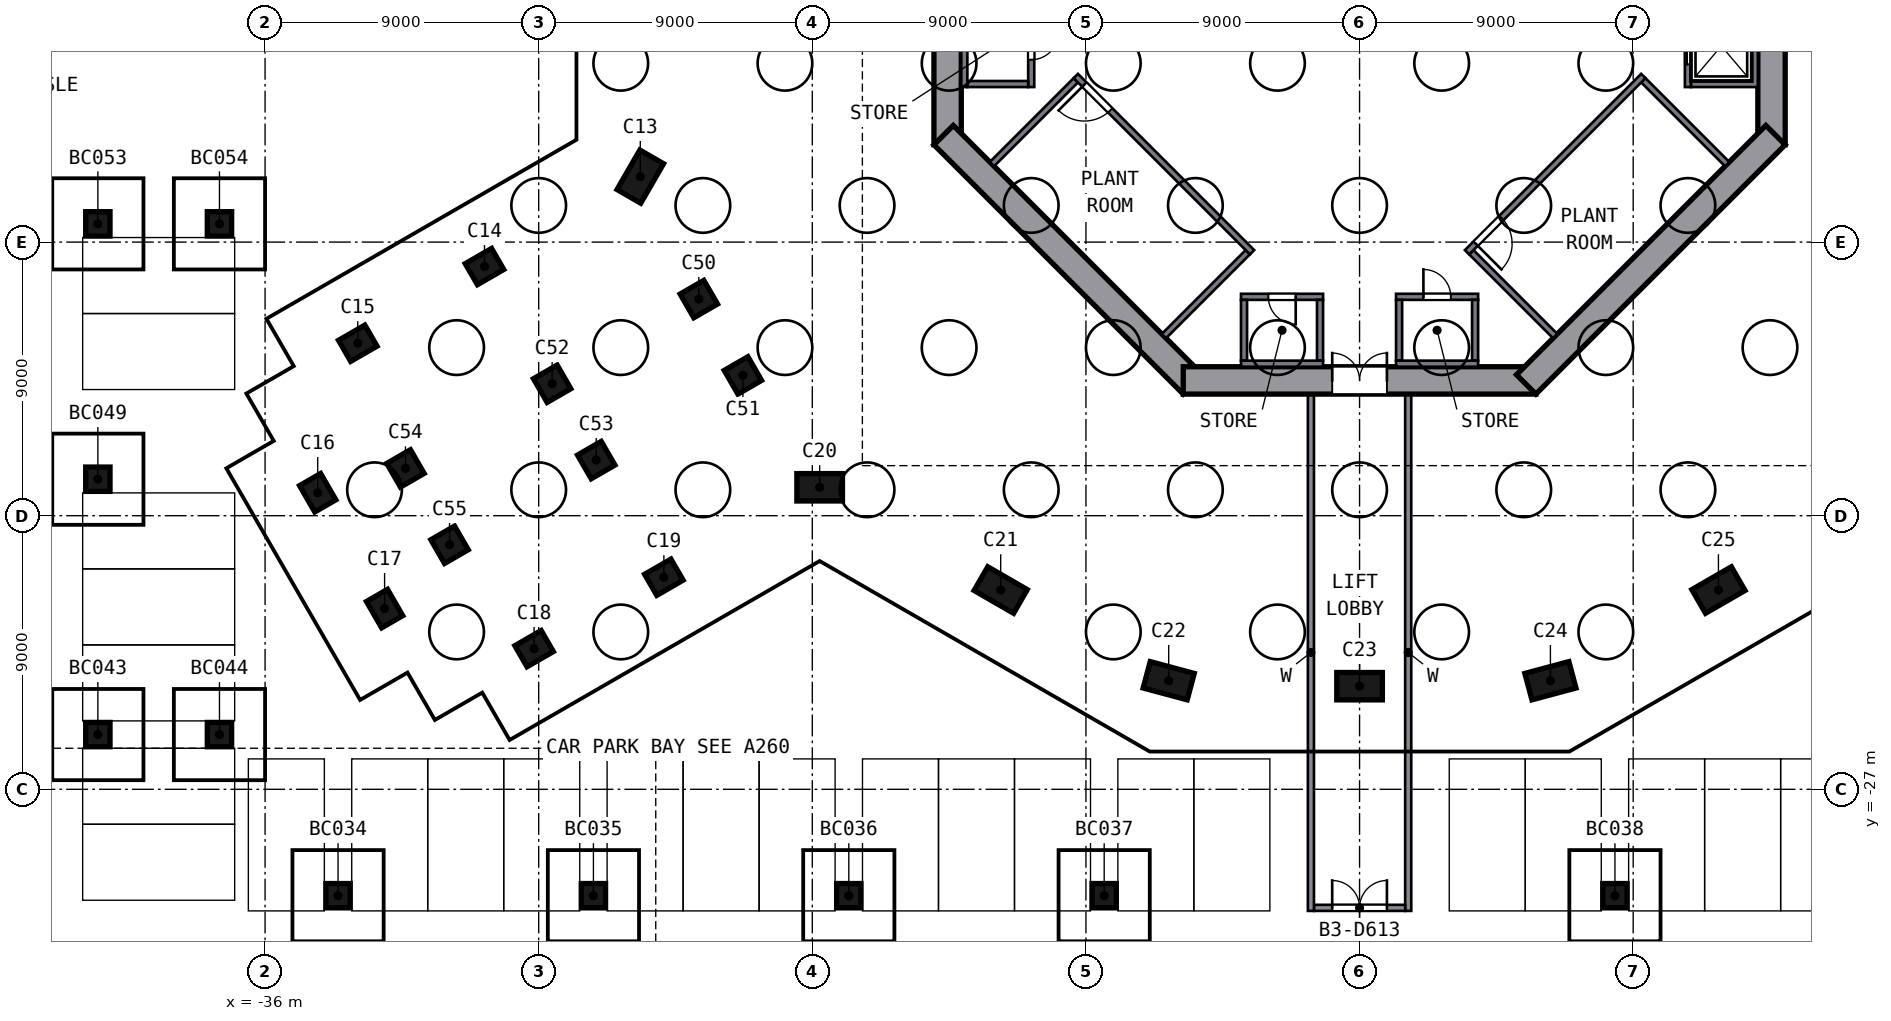
"""IFC4 building model, lengths in metres.
Left out: names, types, materials, properties, quantities, classifications, styles, units other than length and angle.
Written with IfcOpenShell. Run it as: python <this file> out.ifc"""

import sys

from ifc_helpers import new_model, si_unit, direction, frame, frame_2d, origin, origin_2d, place, context, subcontext, project, spatial, polyline, rectangle, outline, extrude, element, fill, save


model = new_model("IFC4")
c1 = context("Model", 3, precision=1e-05, world=origin(), true_north=direction((0.0, 1.0)))
c2 = subcontext(c1, "Body", "Model", "MODEL_VIEW")
j1 = project(units=[si_unit("LENGTHUNIT", "METRE"), si_unit("PLANEANGLEUNIT", "RADIAN")], contexts=[c1])
p1 = place(None, origin())
s1 = spatial("IfcSite", under=j1, at=p1, CompositionType="ELEMENT")
p2 = place(p1, origin())
s2 = spatial("IfcBuilding", under=s1, at=p2, CompositionType="ELEMENT")
p3 = place(p2, frame((0.0, 0.0, -11.7)))
s3 = spatial("IfcBuildingStorey", under=s2, at=p3, CompositionType="ELEMENT", Elevation=-11.7)
p4 = place(p3, frame((-23.658, -6.846, 0.0), z_axis=(0.0, 0.0, 1.0), x_axis=(0.5, 0.866025404, 0.0)))
e1 = element("IfcColumn", 1, at=p4, inside=s3, PredefinedType="COLUMN", context=c2, shape_type="SweptSolid", body=[
    extrude(rectangle(XDim=1.5, YDim=0.9, at=origin_2d()), origin(), (0.0, 0.0, 1.0), 3.45),
])
for number, where, z_axis, x_axis in (
    (2, (-28.783, -9.805, 0.0), (0.0, 0.0, 1.0), (-0.866, -0.5, 0.0)),
    (3, (-32.951, -12.327, 0.0), (0.0, 0.0, 1.0), (-0.866, -0.5, 0.0)),
    (4, (-34.269, -17.245, 0.0), (0.0, 0.0, 1.0), (0.5, -0.866, 0.0)),
    (5, (-32.069, -21.055, 0.0), (0.0, 0.0, 1.0), (0.5, -0.866, 0.0)),
    (6, (-27.151, -22.373, 0.0), (0.0, 0.0, 1.0), (0.866, 0.5, 0.0)),
    (7, (-22.883, -20.024, 0.0), (0.0, 0.0, 1.0), (0.866, 0.5, 0.0)),
):
    element("IfcColumn", number, at=place(p3, frame(where, z_axis=z_axis, x_axis=x_axis)), inside=s3, PredefinedType="COLUMN", context=c2, shape_type="SweptSolid", body=[
        extrude(rectangle(XDim=1.0, YDim=0.8, at=origin_2d()), origin(), (0.0, 0.0, 1.0), 3.45),
    ])
for number, where, z_axis, x_axis in (
    (8, (-17.758, -17.065, 0.0), (0.0, 0.0, 1.0), (-1.0, 0.0, 0.0)),
    (9, (-11.804, -20.445, 0.0), (0.0, 0.0, 1.0), (0.866, -0.5, 0.0)),
    (10, (-6.278, -23.428, 0.0), (0.0, 0.0, 1.0), (-0.966, 0.259, 0.0)),
    (11, (0.0, -23.608, 0.0), (0.0, 0.0, 1.0), (1.0, 0.0, 0.0)),
    (12, (6.278, -23.428, 0.0), (0.0, 0.0, 1.0), (-0.966, -0.259, 0.0)),
    (13, (11.804, -20.445, 0.0), (0.0, 0.0, 1.0), (0.866, 0.5, 0.0)),
):
    element("IfcColumn", number, at=place(p3, frame(where, z_axis=z_axis, x_axis=x_axis)), inside=s3, PredefinedType="COLUMN", context=c2, shape_type="SweptSolid", body=[
        extrude(rectangle(XDim=1.5, YDim=0.9, at=origin_2d()), origin(), (0.0, 0.0, 1.0), 3.45),
    ])
for number, where, z_axis, x_axis in (
    (14, (-21.733, -10.873, 0.0), (0.0, 0.0, 1.0), (-0.866, -0.5, 0.0)),
    (15, (-20.283, -13.385, 0.0), (0.0, 0.0, 1.0), (-0.866, -0.5, 0.0)),
    (16, (-26.558, -13.659, 0.0), (0.0, 0.0, 1.0), (-0.866, -0.5, 0.0)),
    (17, (-25.108, -16.17, 0.0), (0.0, 0.0, 1.0), (-0.866, -0.5, 0.0)),
    (18, (-31.382, -16.444, 0.0), (0.0, 0.0, 1.0), (-0.866, -0.5, 0.0)),
    (19, (-29.932, -18.956, 0.0), (0.0, 0.0, 1.0), (-0.866, -0.5, 0.0)),
):
    element("IfcColumn", number, at=place(p3, frame(where, z_axis=z_axis, x_axis=x_axis)), inside=s3, PredefinedType="COLUMN", context=c2, shape_type="SweptSolid", body=[
        extrude(rectangle(XDim=0.9, YDim=0.9, at=origin_2d()), origin(), (0.0, 0.0, 1.0), 3.45),
    ])
p5 = place(p3, frame((13.55, -5.799, 0.0), z_axis=(0.0, 0.0, 1.0), x_axis=(0.0, 1.0, 0.0)))
e20 = element("IfcWall", 20, at=p5, inside=s3, PredefinedType="SHEAR", context=c2, shape_type="SweptSolid", body=[
    extrude(rectangle(XDim=11.598, YDim=0.9, at=frame_2d((5.799, 0.0))), origin(), (0.0, 0.0, 1.0), 3.9),
])
p6 = place(p5, frame((4.899, 0.0, 0.0)))
e21 = element("IfcOpeningElement", 21, at=p6, cuts=e20, PredefinedType="OPENING", context=c2, shape_type="SweptSolid", body=[
    extrude(rectangle(XDim=1.8, YDim=2.1, at=frame_2d((0.9, 1.05))), frame((0.0, 0.46, 0.0), z_axis=(0.0, -1.0, 0.0), x_axis=(1.0, 0.0, 0.0)), (0.0, 0.0, 1.0), 0.92),
])
p7 = place(p3, frame((-13.55, 5.799, 0.0), z_axis=(0.0, 0.0, 1.0), x_axis=(0.0, -1.0, 0.0)))
e22 = element("IfcWall", 22, at=p7, inside=s3, PredefinedType="SHEAR", context=c2, shape_type="SweptSolid", body=[
    extrude(rectangle(XDim=11.598, YDim=0.9, at=frame_2d((5.799, 0.0))), origin(), (0.0, 0.0, 1.0), 3.9),
])
p8 = place(p7, frame((4.899, 0.0, 0.0)))
e23 = element("IfcOpeningElement", 23, at=p8, cuts=e22, PredefinedType="OPENING", context=c2, shape_type="SweptSolid", body=[
    extrude(rectangle(XDim=1.8, YDim=2.1, at=frame_2d((0.9, 1.05))), frame((0.0, 0.46, 0.0), z_axis=(0.0, -1.0, 0.0), x_axis=(1.0, 0.0, 0.0)), (0.0, 0.0, 1.0), 0.92),
])
p9 = place(p3, frame((-13.682, -5.481, 0.0), z_axis=(0.0, 0.0, 1.0), x_axis=(0.707106781, -0.707106781, 0.0)))
e24 = element("IfcWall", 24, at=p9, inside=s3, PredefinedType="SHEAR", context=c2, shape_type="SweptSolid", body=[
    extrude(rectangle(XDim=11.598, YDim=0.9, at=frame_2d((5.799, 0.0))), origin(), (0.0, 0.0, 1.0), 3.9),
])
p10 = place(p3, frame((-5.799, -13.55, 0.0), z_axis=(0.0, 0.0, 1.0), x_axis=(1.0, 0.0, 0.0)))
e25 = element("IfcWall", 25, at=p10, inside=s3, PredefinedType="SHEAR", context=c2, shape_type="SweptSolid", body=[
    extrude(rectangle(XDim=11.598, YDim=0.9, at=frame_2d((5.799, 0.0))), origin(), (0.0, 0.0, 1.0), 3.9),
])
p11 = place(p10, frame((4.899, 0.0, 0.0)))
e26 = element("IfcOpeningElement", 26, at=p11, cuts=e25, PredefinedType="OPENING", context=c2, shape_type="SweptSolid", body=[
    extrude(rectangle(XDim=1.8, YDim=2.1, at=frame_2d((0.9, 1.05))), frame((0.0, 0.46, 0.0), z_axis=(0.0, -1.0, 0.0), x_axis=(1.0, 0.0, 0.0)), (0.0, 0.0, 1.0), 0.92),
])
p12 = place(p3, frame((5.481, -13.682, 0.0), z_axis=(0.0, 0.0, 1.0), x_axis=(0.707106781, 0.707106781, 0.0)))
e27 = element("IfcWall", 27, at=p12, inside=s3, PredefinedType="SHEAR", context=c2, shape_type="SweptSolid", body=[
    extrude(rectangle(XDim=11.598, YDim=0.9, at=frame_2d((5.799, 0.0))), origin(), (0.0, 0.0, 1.0), 3.9),
])
for number, where, z_axis, x_axis in (
    (28, (-33.6, -30.5, -0.8), (0.0, 0.0, 1.0), (1.0, 0.0, 0.0)),
    (29, (-25.2, -30.5, -0.8), (0.0, 0.0, 1.0), (1.0, 0.0, 0.0)),
    (30, (-16.8, -30.5, -0.8), (0.0, 0.0, 1.0), (1.0, 0.0, 0.0)),
    (31, (-8.4, -30.5, -0.8), (0.0, 0.0, 1.0), (1.0, 0.0, 0.0)),
    (32, (8.4, -30.5, -0.8), (0.0, 0.0, 1.0), (1.0, 0.0, 0.0)),
    (33, (-41.5, -25.2, -0.8), (0.0, 0.0, 1.0), (1.0, 0.0, 0.0)),
    (34, (-37.5, -25.2, -0.8), (0.0, 0.0, 1.0), (1.0, 0.0, 0.0)),
    (35, (-41.5, -16.8, -0.8), (0.0, 0.0, 1.0), (1.0, 0.0, 0.0)),
    (36, (-41.5, -8.4, -0.8), (0.0, 0.0, 1.0), (1.0, 0.0, 0.0)),
    (37, (-37.5, -8.4, -0.8), (0.0, 0.0, 1.0), (1.0, 0.0, 0.0)),
):
    element("IfcColumn", number, at=place(p3, frame(where, z_axis=z_axis, x_axis=x_axis)), inside=s3, PredefinedType="COLUMN", context=c2, shape_type="SweptSolid", body=[
        extrude(rectangle(XDim=0.8, YDim=0.8, at=origin_2d()), origin(), (0.0, 0.0, 1.0), 4.7),
    ])
p13 = place(p3, origin())
e38 = element("IfcWall", 38, at=p13, inside=s3, PredefinedType="SOLIDWALL", context=c2, shape_type="SweptSolid", body=[
    extrude(outline(polyline([(13.1, -3.9), (10.9, -3.9), (10.9, -3.7), (12.9, -3.7), (12.9, -1.4), (10.9, -1.4), (10.9, -1.2), (13.1, -1.2), (13.1, -3.9)])), origin(), (0.0, 0.0, 1.0), 3.45),
])
p14 = place(p3, frame((10.8, -1.2, 0.0), z_axis=(0.0, 0.0, 1.0), x_axis=(0.0, -1.0, 0.0)))
e39 = element("IfcWall", 39, at=p14, inside=s3, PredefinedType="SOLIDWALL", context=c2, shape_type="SweptSolid", body=[
    extrude(rectangle(XDim=2.7, YDim=0.2, at=frame_2d((1.35, 0.0))), origin(), (0.0, 0.0, 1.0), 3.45),
])
p15 = place(p14, frame((0.75, 0.0, 0.0)))
e40 = element("IfcOpeningElement", 40, at=p15, cuts=e39, PredefinedType="OPENING", context=c2, shape_type="SweptSolid", body=[
    extrude(rectangle(XDim=1.2, YDim=2.1, at=frame_2d((0.6, 1.05))), frame((0.0, 0.11, 0.0), z_axis=(0.0, -1.0, 0.0), x_axis=(1.0, 0.0, 0.0)), (0.0, 0.0, 1.0), 0.22),
])
p16 = place(p3, origin())
e41 = element("IfcWall", 41, at=p16, inside=s3, PredefinedType="SOLIDWALL", context=c2, shape_type="SweptSolid", body=[
    extrude(outline(polyline([(-10.9, -3.7), (-10.9, -3.9), (-12.9, -3.9), (-12.9, -3.7), (-10.9, -3.7)])), origin(), (0.0, 0.0, 1.0), 3.45),
])
p17 = place(p3, origin())
e42 = element("IfcWall", 42, at=p17, inside=s3, PredefinedType="SOLIDWALL", context=c2, shape_type="SweptSolid", body=[
    extrude(outline(polyline([(-12.9, -1.2), (-12.9, -3.9), (-13.1, -3.9), (-13.1, -1.2), (-12.9, -1.2)])), origin(), (0.0, 0.0, 1.0), 3.45),
])
p18 = place(p3, frame((-10.8, -1.2, 0.0), z_axis=(0.0, 0.0, 1.0), x_axis=(0.0, -1.0, 0.0)))
e43 = element("IfcWall", 43, at=p18, inside=s3, PredefinedType="SOLIDWALL", context=c2, shape_type="SweptSolid", body=[
    extrude(rectangle(XDim=2.7, YDim=0.2, at=frame_2d((1.35, 0.0))), origin(), (0.0, 0.0, 1.0), 3.45),
])
p19 = place(p18, frame((0.9, 0.0, 0.0)))
e44 = element("IfcOpeningElement", 44, at=p19, cuts=e43, PredefinedType="OPENING", context=c2, shape_type="SweptSolid", body=[
    extrude(rectangle(XDim=0.9, YDim=2.1, at=frame_2d((0.45, 1.05))), frame((0.0, 0.11, 0.0), z_axis=(0.0, -1.0, 0.0), x_axis=(1.0, 0.0, 0.0)), (0.0, 0.0, 1.0), 0.22),
])
p20 = place(p3, origin())
e45 = element("IfcWall", 45, at=p20, inside=s3, PredefinedType="SOLIDWALL", context=c2, shape_type="SweptSolid", body=[
    extrude(outline(polyline([(-1.2, -10.9), (-1.2, -12.9), (-1.4, -12.9), (-1.4, -10.9), (-1.2, -10.9)])), origin(), (0.0, 0.0, 1.0), 3.45),
])
p21 = place(p3, origin())
e46 = element("IfcWall", 46, at=p21, inside=s3, PredefinedType="SOLIDWALL", context=c2, shape_type="SweptSolid", body=[
    extrude(outline(polyline([(-3.7, -10.9), (-3.7, -12.9), (-3.9, -12.9), (-3.9, -10.9), (-3.7, -10.9)])), origin(), (0.0, 0.0, 1.0), 3.45),
])
p22 = place(p3, origin())
e47 = element("IfcWall", 47, at=p22, inside=s3, PredefinedType="SOLIDWALL", context=c2, shape_type="SweptSolid", body=[
    extrude(outline(polyline([(-1.2, -12.9), (-1.2, -13.1), (-3.9, -13.1), (-3.9, -12.9), (-1.2, -12.9)])), origin(), (0.0, 0.0, 1.0), 3.45),
])
p23 = place(p3, frame((-1.2, -10.8, 0.0), z_axis=(0.0, 0.0, 1.0), x_axis=(-1.0, 0.0, 0.0)))
e48 = element("IfcWall", 48, at=p23, inside=s3, PredefinedType="SOLIDWALL", context=c2, shape_type="SweptSolid", body=[
    extrude(rectangle(XDim=2.7, YDim=0.2, at=frame_2d((1.35, 0.0))), origin(), (0.0, 0.0, 1.0), 3.45),
])
p24 = place(p23, frame((0.9, 0.0, 0.0)))
e49 = element("IfcOpeningElement", 49, at=p24, cuts=e48, PredefinedType="OPENING", context=c2, shape_type="SweptSolid", body=[
    extrude(rectangle(XDim=0.9, YDim=2.1, at=frame_2d((0.45, 1.05))), frame((0.0, 0.11, 0.0), z_axis=(0.0, -1.0, 0.0), x_axis=(1.0, 0.0, 0.0)), (0.0, 0.0, 1.0), 0.22),
])
p25 = place(p3, origin())
e50 = element("IfcWall", 50, at=p25, inside=s3, PredefinedType="SOLIDWALL", context=c2, shape_type="SweptSolid", body=[
    extrude(outline(polyline([(1.2, -10.9), (1.4, -10.9), (1.4, -12.9), (1.2, -12.9), (1.2, -10.9)])), origin(), (0.0, 0.0, 1.0), 3.45),
])
p26 = place(p3, origin())
e51 = element("IfcWall", 51, at=p26, inside=s3, PredefinedType="SOLIDWALL", context=c2, shape_type="SweptSolid", body=[
    extrude(outline(polyline([(3.7, -10.9), (3.9, -10.9), (3.9, -12.9), (3.7, -12.9), (3.7, -10.9)])), origin(), (0.0, 0.0, 1.0), 3.45),
])
p27 = place(p3, origin())
e52 = element("IfcWall", 52, at=p27, inside=s3, PredefinedType="SOLIDWALL", context=c2, shape_type="SweptSolid", body=[
    extrude(outline(polyline([(1.2, -12.9), (3.9, -12.9), (3.9, -13.1), (1.2, -13.1), (1.2, -12.9)])), origin(), (0.0, 0.0, 1.0), 3.45),
])
p28 = place(p3, frame((1.2, -10.8, 0.0), z_axis=(0.0, 0.0, 1.0), x_axis=(1.0, 0.0, 0.0)))
e53 = element("IfcWall", 53, at=p28, inside=s3, PredefinedType="SOLIDWALL", context=c2, shape_type="SweptSolid", body=[
    extrude(rectangle(XDim=2.7, YDim=0.2, at=frame_2d((1.35, 0.0))), origin(), (0.0, 0.0, 1.0), 3.45),
])
p29 = place(p28, frame((0.9, 0.0, 0.0)))
e54 = element("IfcOpeningElement", 54, at=p29, cuts=e53, PredefinedType="OPENING", context=c2, shape_type="SweptSolid", body=[
    extrude(rectangle(XDim=0.9, YDim=2.1, at=frame_2d((0.45, 1.05))), frame((0.0, 0.11, 0.0), z_axis=(0.0, -1.0, 0.0), x_axis=(1.0, 0.0, 0.0)), (0.0, 0.0, 1.0), 0.22),
])
p30 = place(p3, frame((-3.535, -9.334, 0.0), z_axis=(0.0, 0.0, 1.0), x_axis=(-0.707106781, 0.707106781, 0.0)))
e55 = element("IfcWall", 55, at=p30, inside=s3, PredefinedType="SOLIDWALL", context=c2, shape_type="SweptSolid", body=[
    extrude(rectangle(XDim=8.2, YDim=0.2, at=frame_2d((4.1, 0.0))), origin(), (0.0, 0.0, 1.0), 3.45),
])
p31 = place(p30, frame((6.6, 0.0, 0.0)))
e56 = element("IfcOpeningElement", 56, at=p31, cuts=e55, PredefinedType="OPENING", context=c2, shape_type="SweptSolid", body=[
    extrude(rectangle(XDim=1.2, YDim=2.1, at=frame_2d((0.6, 1.05))), frame((0.0, 0.11, 0.0), z_axis=(0.0, -1.0, 0.0), x_axis=(1.0, 0.0, 0.0)), (0.0, 0.0, 1.0), 0.22),
])
for number, where, z_axis, x_axis in (
    (57, (-9.334, -3.677, 0.0), (0.0, 0.0, 1.0), (-0.707, -0.707, 0.0)),
    (58, (-3.677, -9.334, 0.0), (0.0, 0.0, 1.0), (-0.707, -0.707, 0.0)),
):
    element("IfcWall", number, at=place(p3, frame(where, z_axis=z_axis, x_axis=x_axis)), inside=s3, PredefinedType="SOLIDWALL", context=c2, shape_type="SweptSolid", body=[
        extrude(rectangle(XDim=3.9, YDim=0.2, at=frame_2d((1.95, 0.0))), origin(), (0.0, 0.0, 1.0), 3.45),
    ])
p32 = place(p3, frame((9.334, -3.535, 0.0), z_axis=(0.0, 0.0, 1.0), x_axis=(-0.707106781, -0.707106781, 0.0)))
e59 = element("IfcWall", 59, at=p32, inside=s3, PredefinedType="SOLIDWALL", context=c2, shape_type="SweptSolid", body=[
    extrude(rectangle(XDim=8.2, YDim=0.2, at=frame_2d((4.1, 0.0))), origin(), (0.0, 0.0, 1.0), 3.45),
])
p33 = place(p32, frame((6.6, 0.0, 0.0)))
e60 = element("IfcOpeningElement", 60, at=p33, cuts=e59, PredefinedType="OPENING", context=c2, shape_type="SweptSolid", body=[
    extrude(rectangle(XDim=1.2, YDim=2.1, at=frame_2d((0.6, 1.05))), frame((0.0, 0.11, 0.0), z_axis=(0.0, -1.0, 0.0), x_axis=(1.0, 0.0, 0.0)), (0.0, 0.0, 1.0), 0.22),
])
for number, where, z_axis, x_axis in (
    (61, (3.677, -9.334, 0.0), (0.0, 0.0, 1.0), (0.707, -0.707, 0.0)),
    (62, (9.334, -3.677, 0.0), (0.0, 0.0, 1.0), (0.707, -0.707, 0.0)),
):
    element("IfcWall", number, at=place(p3, frame(where, z_axis=z_axis, x_axis=x_axis)), inside=s3, PredefinedType="SOLIDWALL", context=c2, shape_type="SweptSolid", body=[
        extrude(rectangle(XDim=3.9, YDim=0.2, at=frame_2d((1.95, 0.0))), origin(), (0.0, 0.0, 1.0), 3.45),
    ])
for number, where, z_axis, x_axis in (
    (63, (-1.6, -31.0, 0.0), (0.0, 0.0, 1.0), (0.0, 1.0, 0.0)),
    (64, (1.6, -31.0, 0.0), (0.0, 0.0, 1.0), (0.0, 1.0, 0.0)),
):
    element("IfcWall", number, at=place(p3, frame(where, z_axis=z_axis, x_axis=x_axis)), inside=s3, PredefinedType="PARTITIONING", context=c2, shape_type="SweptSolid", body=[
        extrude(rectangle(XDim=17.0, YDim=0.2, at=frame_2d((8.5, 0.0))), origin(), (0.0, 0.0, 1.0), 3.45),
    ])
p34 = place(p3, frame((-1.5, -30.9, 0.0), z_axis=(0.0, 0.0, 1.0), x_axis=(1.0, 0.0, 0.0)))
e65 = element("IfcWall", 65, at=p34, inside=s3, PredefinedType="PARTITIONING", context=c2, shape_type="SweptSolid", body=[
    extrude(rectangle(XDim=3.0, YDim=0.2, at=frame_2d((1.5, 0.0))), origin(), (0.0, 0.0, 1.0), 3.45),
])
p35 = place(p34, frame((0.6, 0.0, 0.0)))
e66 = element("IfcOpeningElement", 66, at=p35, cuts=e65, PredefinedType="OPENING", context=c2, shape_type="SweptSolid", body=[
    extrude(rectangle(XDim=1.8, YDim=2.1, at=frame_2d((0.9, 1.05))), frame((0.0, 0.11, 0.0), z_axis=(0.0, -1.0, 0.0), x_axis=(1.0, 0.0, 0.0)), (0.0, 0.0, 1.0), 0.22),
])
p36 = place(p19, origin())
e67 = element("IfcDoor", 67, at=p36, inside=s3, OperationType="SINGLE_SWING_LEFT", PredefinedType="DOOR", context=c2, shape_type="SweptSolid", body=[
    extrude(rectangle(XDim=0.9, YDim=2.1, at=frame_2d((0.45, 1.05))), frame((0.0, 0.025, 0.0), z_axis=(0.0, -1.0, 0.0), x_axis=(1.0, 0.0, 0.0)), (0.0, 0.0, 1.0), 0.05),
])
fill(e44, e67)
p37 = place(p24, origin())
e68 = element("IfcDoor", 68, at=p37, inside=s3, OperationType="SINGLE_SWING_LEFT", PredefinedType="DOOR", context=c2, shape_type="SweptSolid", body=[
    extrude(rectangle(XDim=0.9, YDim=2.1, at=frame_2d((0.45, 1.05))), frame((0.0, 0.025, 0.0), z_axis=(0.0, -1.0, 0.0), x_axis=(1.0, 0.0, 0.0)), (0.0, 0.0, 1.0), 0.05),
])
fill(e49, e68)
p38 = place(p29, origin())
e69 = element("IfcDoor", 69, at=p38, inside=s3, OperationType="SINGLE_SWING_LEFT", PredefinedType="DOOR", context=c2, shape_type="SweptSolid", body=[
    extrude(rectangle(XDim=0.9, YDim=2.1, at=frame_2d((0.45, 1.05))), frame((0.0, 0.025, 0.0), z_axis=(0.0, -1.0, 0.0), x_axis=(1.0, 0.0, 0.0)), (0.0, 0.0, 1.0), 0.05),
])
fill(e54, e69)
p39 = place(p15, origin())
e70 = element("IfcDoor", 70, at=p39, inside=s3, OperationType="DOUBLE_DOOR_SLIDING", PredefinedType="DOOR", context=c2, shape_type="SweptSolid", body=[
    extrude(rectangle(XDim=1.2, YDim=2.1, at=frame_2d((0.6, 1.05))), frame((0.0, 0.025, 0.0), z_axis=(0.0, -1.0, 0.0), x_axis=(1.0, 0.0, 0.0)), (0.0, 0.0, 1.0), 0.05),
])
fill(e40, e70)
p40 = place(p31, origin())
e71 = element("IfcDoor", 71, at=p40, inside=s3, OperationType="SINGLE_SWING_RIGHT", PredefinedType="DOOR", context=c2, shape_type="SweptSolid", body=[
    extrude(rectangle(XDim=1.2, YDim=2.1, at=frame_2d((0.6, 1.05))), frame((0.0, 0.025, 0.0), z_axis=(0.0, -1.0, 0.0), x_axis=(1.0, 0.0, 0.0)), (0.0, 0.0, 1.0), 0.05),
])
fill(e56, e71)
p41 = place(p33, origin())
e72 = element("IfcDoor", 72, at=p41, inside=s3, OperationType="SINGLE_SWING_RIGHT", PredefinedType="DOOR", context=c2, shape_type="SweptSolid", body=[
    extrude(rectangle(XDim=1.2, YDim=2.1, at=frame_2d((0.6, 1.05))), frame((0.0, 0.025, 0.0), z_axis=(0.0, -1.0, 0.0), x_axis=(1.0, 0.0, 0.0)), (0.0, 0.0, 1.0), 0.05),
])
fill(e60, e72)
p42 = place(p11, origin())
e73 = element("IfcDoor", 73, at=p42, inside=s3, OperationType="DOUBLE_DOOR_SINGLE_SWING", PredefinedType="DOOR", context=c2, shape_type="SweptSolid", body=[
    extrude(rectangle(XDim=1.8, YDim=2.1, at=frame_2d((0.9, 1.05))), frame((0.0, 0.025, 0.0), z_axis=(0.0, -1.0, 0.0), x_axis=(1.0, 0.0, 0.0)), (0.0, 0.0, 1.0), 0.05),
])
fill(e26, e73)
p43 = place(p35, origin())
e74 = element("IfcDoor", 74, at=p43, inside=s3, OperationType="DOUBLE_DOOR_SINGLE_SWING", PredefinedType="DOOR", context=c2, shape_type="SweptSolid", body=[
    extrude(rectangle(XDim=1.8, YDim=2.1, at=frame_2d((0.9, 1.05))), frame((0.0, 0.025, 0.0), z_axis=(0.0, -1.0, 0.0), x_axis=(1.0, 0.0, 0.0)), (0.0, 0.0, 1.0), 0.05),
])
fill(e66, e74)
save(model, sys.argv[1])
